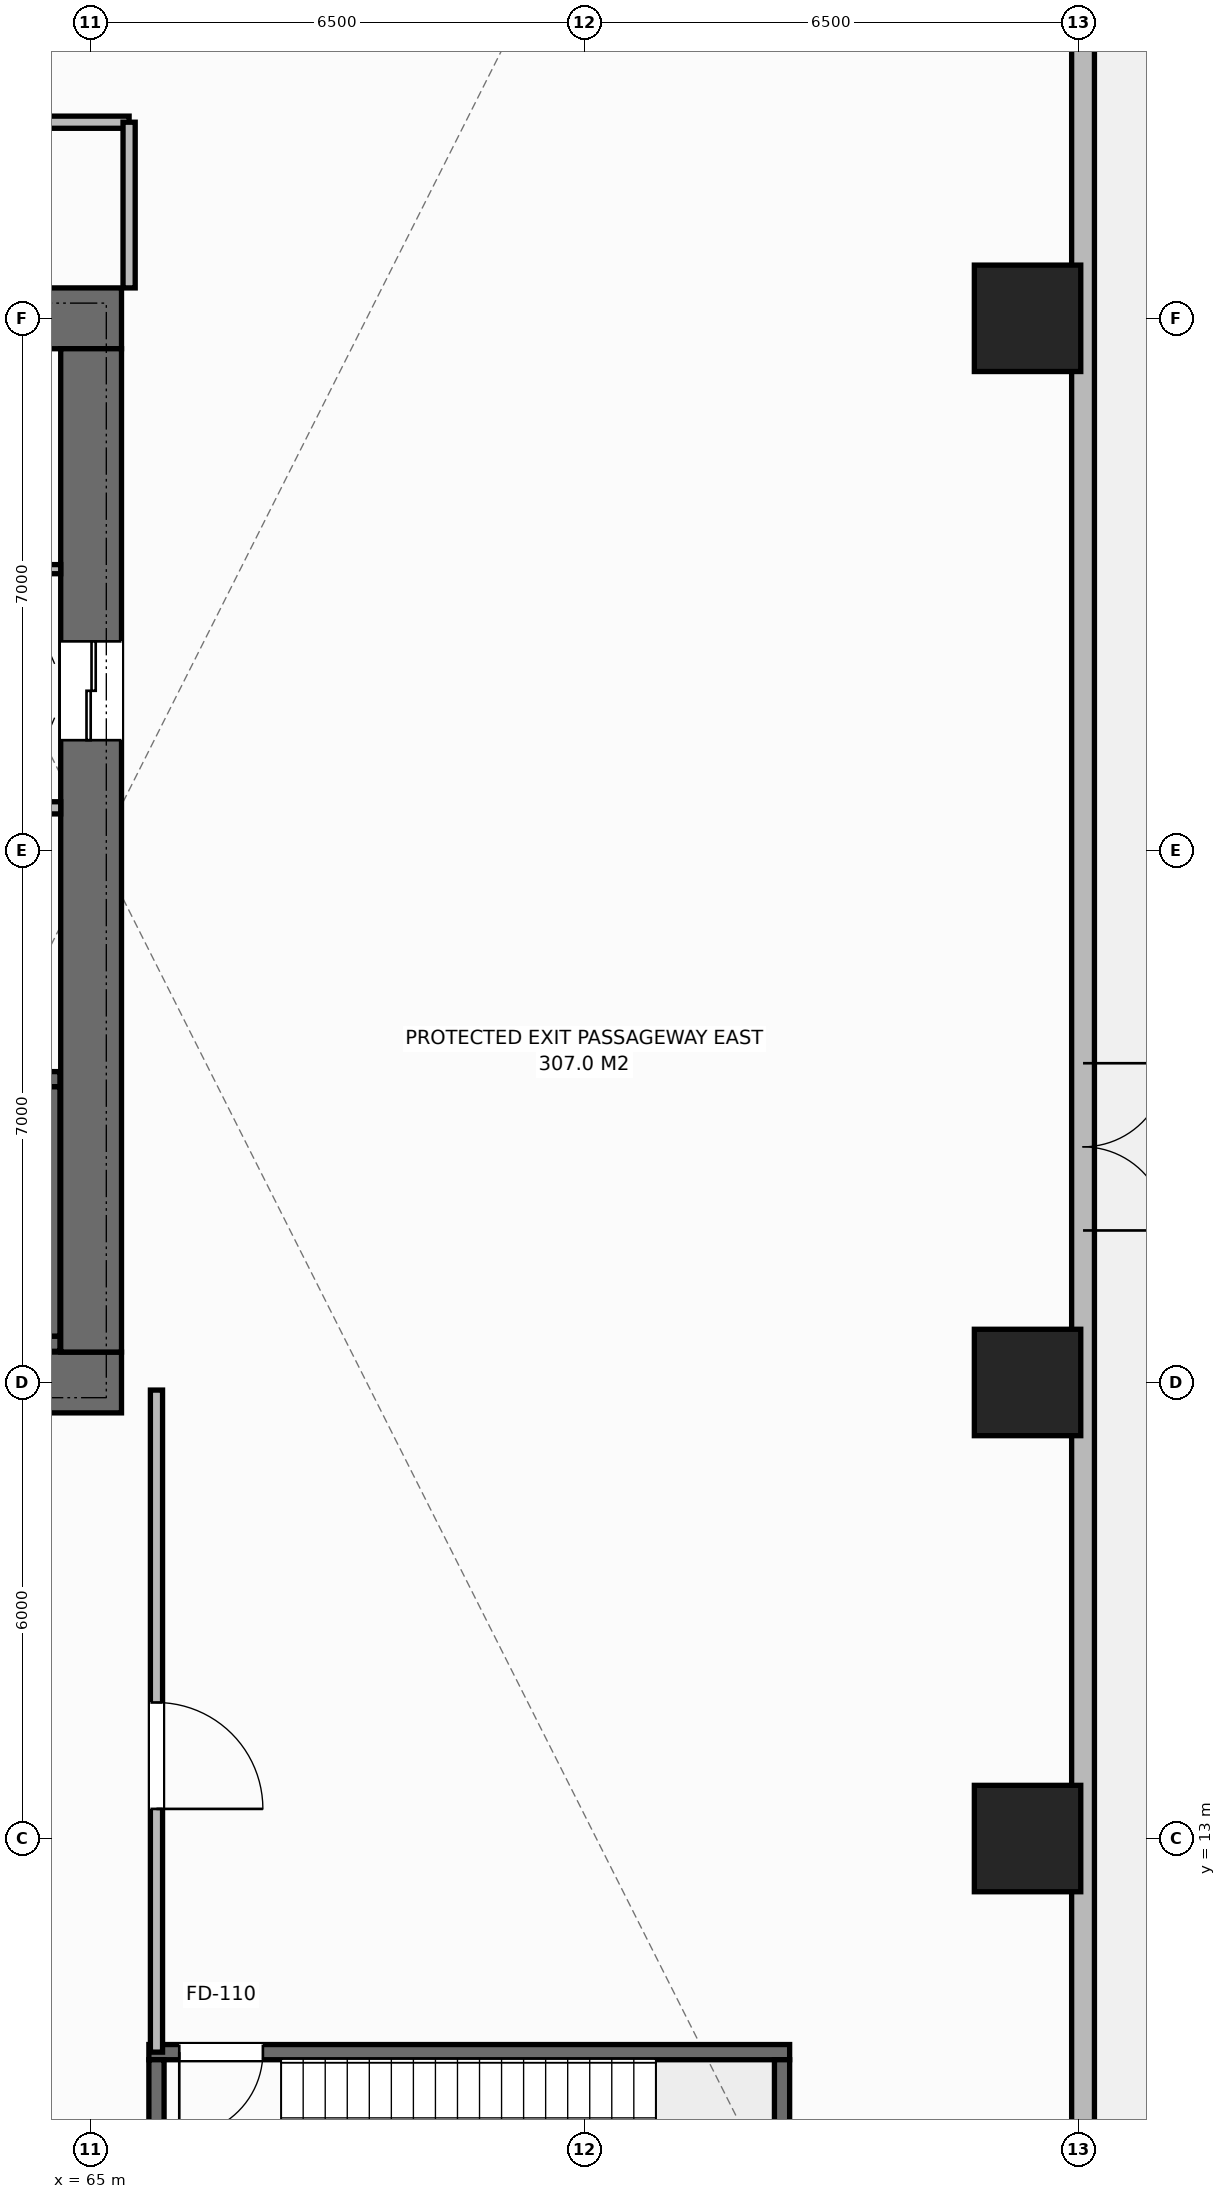
"""IFC4 building model, lengths in metres.
Left out: names, types, materials, properties, quantities, classifications, styles, units other than length and angle.
Written with IfcOpenShell. Run it as: python <this file> out.ifc"""

import sys

from ifc_helpers import new_model, si_unit, direction, frame, frame_2d, origin, origin_2d, place, context, subcontext, project, spatial, rectangle, extrude, element, fill, save


model = new_model("IFC4")
c1 = context("Model", 3, precision=1e-05, world=origin(), true_north=direction((0.0, 1.0)))
c2 = subcontext(c1, "Body", "Model", "MODEL_VIEW")
j1 = project(units=[si_unit("LENGTHUNIT", "METRE"), si_unit("PLANEANGLEUNIT", "RADIAN")], contexts=[c1])
p1 = place(None, origin())
s1 = spatial("IfcSite", under=j1, at=p1, CompositionType="ELEMENT")
p2 = place(p1, origin())
s2 = spatial("IfcBuilding", under=s1, at=p2, CompositionType="ELEMENT")
p3 = place(p2, origin())
s3 = spatial("IfcBuildingStorey", under=s2, at=p3, CompositionType="ELEMENT", Elevation=0.0)
p4 = place(p3, frame((51.6, 19.0, 0.0), z_axis=(0.0, 0.0, 1.0), x_axis=(1.0, 0.0, 0.0)))
e1 = element("IfcWall", 1, at=p4, inside=s3, PredefinedType="SHEAR", context=c2, shape_type="SweptSolid", body=[
    extrude(rectangle(XDim=13.8, YDim=0.8, at=frame_2d((6.9, 0.0))), origin(), (0.0, 0.0, 1.0), 6.0),
])
p5 = place(p4, frame((3.12, 0.0, 0.0)))
e2 = element("IfcOpeningElement", 2, at=p5, cuts=e1, PredefinedType="OPENING", context=c2, shape_type="SweptSolid", body=[
    extrude(rectangle(XDim=1.4, YDim=2.2, at=frame_2d((0.7, 1.1))), frame((0.0, 0.41, 0.0), z_axis=(0.0, -1.0, 0.0), x_axis=(1.0, 0.0, 0.0)), (0.0, 0.0, 1.0), 0.82),
])
p6 = place(p3, frame((51.6, 33.0, 0.0), z_axis=(0.0, 0.0, 1.0), x_axis=(1.0, 0.0, 0.0)))
e3 = element("IfcWall", 3, at=p6, inside=s3, PredefinedType="SHEAR", context=c2, shape_type="SweptSolid", body=[
    extrude(rectangle(XDim=13.8, YDim=0.8, at=frame_2d((6.9, 0.0))), origin(), (0.0, 0.0, 1.0), 6.0),
])
p7 = place(p6, frame((3.12, 0.0, 0.0)))
e4 = element("IfcOpeningElement", 4, at=p7, cuts=e3, PredefinedType="OPENING", context=c2, shape_type="SweptSolid", body=[
    extrude(rectangle(XDim=1.4, YDim=2.2, at=frame_2d((0.7, 1.1))), frame((0.0, 0.41, 0.0), z_axis=(0.0, -1.0, 0.0), x_axis=(1.0, 0.0, 0.0)), (0.0, 0.0, 1.0), 0.82),
])
p8 = place(p6, frame((11.0, 0.0, 0.0)))
e5 = element("IfcOpeningElement", 5, at=p8, cuts=e3, PredefinedType="OPENING", context=c2, shape_type="SweptSolid", body=[
    extrude(rectangle(XDim=0.9, YDim=2.15, at=frame_2d((0.45, 1.075))), frame((0.0, 0.41, 0.0), z_axis=(0.0, -1.0, 0.0), x_axis=(1.0, 0.0, 0.0)), (0.0, 0.0, 1.0), 0.82),
])
p9 = place(p6, frame((6.4, 0.0, 0.0)))
e6 = element("IfcOpeningElement", 6, at=p9, cuts=e3, PredefinedType="OPENING", context=c2, shape_type="SweptSolid", body=[
    extrude(rectangle(XDim=0.95, YDim=2.15, at=frame_2d((0.475, 1.075))), frame((0.0, 0.41, 0.0), z_axis=(0.0, -1.0, 0.0), x_axis=(1.0, 0.0, 0.0)), (0.0, 0.0, 1.0), 0.82),
])
p10 = place(p6, frame((8.85, 0.0, 0.0)))
e7 = element("IfcOpeningElement", 7, at=p10, cuts=e3, PredefinedType="OPENING", context=c2, shape_type="SweptSolid", body=[
    extrude(rectangle(XDim=0.9, YDim=2.15, at=frame_2d((0.45, 1.075))), frame((0.0, 0.41, 0.0), z_axis=(0.0, -1.0, 0.0), x_axis=(1.0, 0.0, 0.0)), (0.0, 0.0, 1.0), 0.82),
])
p11 = place(p3, frame((65.0, 19.4, 0.0), z_axis=(0.0, 0.0, 1.0), x_axis=(0.0, 1.0, 0.0)))
e8 = element("IfcWall", 8, at=p11, inside=s3, PredefinedType="SHEAR", context=c2, shape_type="SweptSolid", body=[
    extrude(rectangle(XDim=13.2, YDim=0.8, at=frame_2d((6.6, 0.0))), origin(), (0.0, 0.0, 1.0), 6.0),
])
p12 = place(p11, frame((8.05, 0.0, 0.0)))
e9 = element("IfcOpeningElement", 9, at=p12, cuts=e8, PredefinedType="OPENING", context=c2, shape_type="SweptSolid", body=[
    extrude(rectangle(XDim=1.3, YDim=2.2, at=frame_2d((0.65, 1.1))), frame((0.0, 0.41, 0.0), z_axis=(0.0, -1.0, 0.0), x_axis=(1.0, 0.0, 0.0)), (0.0, 0.0, 1.0), 0.82),
])
p13 = place(p3, frame((56.16, 19.51, 0.0), z_axis=(0.0, 0.0, 1.0), x_axis=(1.0, 0.0, 0.0)))
e10 = element("IfcWall", 10, at=p13, inside=s3, PredefinedType="SHEAR", context=c2, shape_type="SweptSolid", body=[
    extrude(rectangle(XDim=8.43, YDim=0.2, at=frame_2d((4.215, 0.0))), origin(), (0.0, 0.0, 1.0), 6.0),
])
p14 = place(p3, frame((56.16, 22.99, 0.0), z_axis=(0.0, 0.0, 1.0), x_axis=(1.0, 0.0, 0.0)))
e11 = element("IfcWall", 11, at=p14, inside=s3, PredefinedType="SHEAR", context=c2, shape_type="SweptSolid", body=[
    extrude(rectangle(XDim=8.43, YDim=0.2, at=frame_2d((4.215, 0.0))), origin(), (0.0, 0.0, 1.0), 6.0),
])
p15 = place(p14, frame((0.45, 0.0, 0.0)))
e12 = element("IfcOpeningElement", 12, at=p15, cuts=e11, PredefinedType="OPENING", context=c2, shape_type="SweptSolid", body=[
    extrude(rectangle(XDim=1.0, YDim=2.15, at=frame_2d((0.5, 1.075))), frame((0.0, 0.11, 0.0), z_axis=(0.0, -1.0, 0.0), x_axis=(1.0, 0.0, 0.0)), (0.0, 0.0, 1.0), 0.22),
])
p16 = place(p3, frame((64.49, 19.61, 0.0), z_axis=(0.0, 0.0, 1.0), x_axis=(0.0, 1.0, 0.0)))
e13 = element("IfcWall", 13, at=p16, inside=s3, PredefinedType="SHEAR", context=c2, shape_type="SweptSolid", body=[
    extrude(rectangle(XDim=3.28, YDim=0.2, at=frame_2d((1.64, 0.0))), origin(), (0.0, 0.0, 1.0), 6.0),
])
p17 = place(p3, frame((65.76, 10.19, 0.0), z_axis=(0.0, 0.0, 1.0), x_axis=(1.0, 0.0, 0.0)))
e14 = element("IfcWall", 14, at=p17, inside=s3, PredefinedType="SHEAR", context=c2, shape_type="SweptSolid", body=[
    extrude(rectangle(XDim=8.43, YDim=0.2, at=frame_2d((4.215, 0.0))), origin(), (0.0, 0.0, 1.0), 6.0),
])
p18 = place(p17, frame((0.4, 0.0, 0.0)))
e15 = element("IfcOpeningElement", 15, at=p18, cuts=e14, PredefinedType="OPENING", context=c2, shape_type="SweptSolid", body=[
    extrude(rectangle(XDim=1.1, YDim=2.15, at=frame_2d((0.55, 1.075))), frame((0.0, 0.11, 0.0), z_axis=(0.0, -1.0, 0.0), x_axis=(1.0, 0.0, 0.0)), (0.0, 0.0, 1.0), 0.22),
])
for number, where, z_axis, x_axis in (
    (16, (65.86, 6.81, 0.0), (0.0, 0.0, 1.0), (0.0, 1.0, 0.0)),
    (17, (74.09, 6.81, 0.0), (0.0, 0.0, 1.0), (0.0, 1.0, 0.0)),
):
    element("IfcWall", number, at=place(p3, frame(where, z_axis=z_axis, x_axis=x_axis)), inside=s3, PredefinedType="SHEAR", context=c2, shape_type="SweptSolid", body=[
        extrude(rectangle(XDim=3.28, YDim=0.2, at=frame_2d((1.64, 0.0))), origin(), (0.0, 0.0, 1.0), 6.0),
    ])
for number, where, z_axis, x_axis in (
    (18, (77.32, 13.0, 0.0), (0.0, 0.0, 1.0), (1.0, 0.0, 0.0)),
    (19, (77.32, 19.0, 0.0), (0.0, 0.0, 1.0), (1.0, 0.0, 0.0)),
    (20, (77.32, 33.0, 0.0), (0.0, 0.0, 1.0), (1.0, 0.0, 0.0)),
):
    element("IfcColumn", number, at=place(p3, frame(where, z_axis=z_axis, x_axis=x_axis)), inside=s3, PredefinedType="COLUMN", context=c2, shape_type="SweptSolid", body=[
        extrude(rectangle(XDim=1.4, YDim=1.4, at=origin_2d()), origin(), (0.0, 0.0, 1.0), 6.0),
    ])
p19 = place(p3, frame((78.05, 48.8, 0.0), z_axis=(0.0, 0.0, 1.0), x_axis=(0.0, -1.0, 0.0)))
e21 = element("IfcWall", 21, at=p19, inside=s3, PredefinedType="STANDARD", context=c2, shape_type="SweptSolid", body=[
    extrude(rectangle(XDim=45.6, YDim=0.3, at=frame_2d((22.8, 0.0))), origin(), (0.0, 0.0, 1.0), 5.72),
])
p20 = place(p19, frame((2.6, 0.0, 0.0)))
e22 = element("IfcOpeningElement", 22, at=p20, cuts=e21, PredefinedType="OPENING", context=c2, shape_type="SweptSolid", body=[
    extrude(rectangle(XDim=6.0, YDim=3.2, at=frame_2d((3.0, 1.6))), frame((0.0, 0.16, 0.0), z_axis=(0.0, -1.0, 0.0), x_axis=(1.0, 0.0, 0.0)), (0.0, 0.0, 1.0), 0.32),
])
p21 = place(p19, frame((25.6, 0.0, 0.0)))
e23 = element("IfcOpeningElement", 23, at=p21, cuts=e21, PredefinedType="OPENING", context=c2, shape_type="SweptSolid", body=[
    extrude(rectangle(XDim=2.2, YDim=2.4, at=frame_2d((1.1, 1.2))), frame((0.0, 0.16, 0.0), z_axis=(0.0, -1.0, 0.0), x_axis=(1.0, 0.0, 0.0)), (0.0, 0.0, 1.0), 0.32),
])
p22 = place(p3, frame((56.26, 26.56, 0.0), z_axis=(0.0, 0.0, 1.0), x_axis=(1.0, 0.0, 0.0)))
e24 = element("IfcWall", 24, at=p22, inside=s3, PredefinedType="STANDARD", context=c2, shape_type="SweptSolid", body=[
    extrude(rectangle(XDim=8.34, YDim=0.16, at=frame_2d((4.17, 0.0))), origin(), (0.0, 0.0, 1.0), 5.72),
])
p23 = place(p3, frame((61.87, 29.7, 0.0), z_axis=(0.0, 0.0, 1.0), x_axis=(1.0, 0.0, 0.0)))
e25 = element("IfcWall", 25, at=p23, inside=s3, PredefinedType="PARTITIONING", context=c2, shape_type="SweptSolid", body=[
    extrude(rectangle(XDim=2.73, YDim=0.12, at=frame_2d((1.365, 0.0))), origin(), (0.0, 0.0, 1.0), 5.72),
])
p24 = place(p3, frame((55.58, 35.58, 0.0), z_axis=(0.0, 0.0, 1.0), x_axis=(1.0, 0.0, 0.0)))
e26 = element("IfcWall", 26, at=p24, inside=s3, PredefinedType="STANDARD", context=c2, shape_type="SweptSolid", body=[
    extrude(rectangle(XDim=9.92, YDim=0.16, at=frame_2d((4.96, 0.0))), origin(), (0.0, 0.0, 1.0), 5.72),
])
p25 = place(p24, frame((1.1, 0.0, 0.0)))
e27 = element("IfcOpeningElement", 27, at=p25, cuts=e26, PredefinedType="OPENING", context=c2, shape_type="SweptSolid", body=[
    extrude(rectangle(XDim=0.9, YDim=2.15, at=frame_2d((0.45, 1.075))), frame((0.0, 0.09, 0.0), z_axis=(0.0, -1.0, 0.0), x_axis=(1.0, 0.0, 0.0)), (0.0, 0.0, 1.0), 0.18),
])
p26 = place(p24, frame((5.9, 0.0, 0.0)))
e28 = element("IfcOpeningElement", 28, at=p26, cuts=e26, PredefinedType="OPENING", context=c2, shape_type="SweptSolid", body=[
    extrude(rectangle(XDim=1.1, YDim=2.15, at=frame_2d((0.55, 1.075))), frame((0.0, 0.09, 0.0), z_axis=(0.0, -1.0, 0.0), x_axis=(1.0, 0.0, 0.0)), (0.0, 0.0, 1.0), 0.18),
])
p27 = place(p3, frame((65.5, 33.4, 0.0), z_axis=(0.0, 0.0, 1.0), x_axis=(0.0, 1.0, 0.0)))
e29 = element("IfcWall", 29, at=p27, inside=s3, PredefinedType="STANDARD", context=c2, shape_type="SweptSolid", body=[
    extrude(rectangle(XDim=2.18, YDim=0.16, at=frame_2d((1.09, 0.0))), origin(), (0.0, 0.0, 1.0), 5.72),
])
p28 = place(p3, frame((65.86, 10.19, 0.0), z_axis=(0.0, 0.0, 1.0), x_axis=(0.0, 1.0, 0.0)))
e30 = element("IfcWall", 30, at=p28, inside=s3, PredefinedType="STANDARD", context=c2, shape_type="SweptSolid", body=[
    extrude(rectangle(XDim=8.71, YDim=0.16, at=frame_2d((4.355, 0.0))), origin(), (0.0, 0.0, 1.0), 5.72),
])
p29 = place(p28, frame((3.2, 0.0, 0.0)))
e31 = element("IfcOpeningElement", 31, at=p29, cuts=e30, PredefinedType="OPENING", context=c2, shape_type="SweptSolid", body=[
    extrude(rectangle(XDim=1.4, YDim=2.2, at=frame_2d((0.7, 1.1))), frame((0.0, 0.09, 0.0), z_axis=(0.0, -1.0, 0.0), x_axis=(1.0, 0.0, 0.0)), (0.0, 0.0, 1.0), 0.18),
])
p30 = place(p21, origin())
e32 = element("IfcDoor", 32, at=p30, inside=s3, OperationType="DOUBLE_DOOR_SINGLE_SWING", PredefinedType="DOOR", context=c2, shape_type="SweptSolid", body=[
    extrude(rectangle(XDim=2.2, YDim=2.4, at=frame_2d((1.1, 1.2))), frame((0.0, 0.025, 0.0), z_axis=(0.0, -1.0, 0.0), x_axis=(1.0, 0.0, 0.0)), (0.0, 0.0, 1.0), 0.05),
])
fill(e23, e32)
p31 = place(p12, origin())
e33 = element("IfcDoor", 33, at=p31, inside=s3, OperationType="DOUBLE_DOOR_SLIDING", PredefinedType="DOOR", context=c2, shape_type="SweptSolid", body=[
    extrude(rectangle(XDim=1.3, YDim=2.2, at=frame_2d((0.65, 1.1))), frame((0.0, 0.025, 0.0), z_axis=(0.0, -1.0, 0.0), x_axis=(1.0, 0.0, 0.0)), (0.0, 0.0, 1.0), 0.05),
])
fill(e9, e33)
p32 = place(p18, origin())
e34 = element("IfcDoor", 34, at=p32, inside=s3, OperationType="SINGLE_SWING_RIGHT", PredefinedType="DOOR", context=c2, shape_type="SweptSolid", body=[
    extrude(rectangle(XDim=1.1, YDim=2.15, at=frame_2d((0.55, 1.075))), frame((0.0, 0.025, 0.0), z_axis=(0.0, -1.0, 0.0), x_axis=(1.0, 0.0, 0.0)), (0.0, 0.0, 1.0), 0.05),
])
fill(e15, e34)
p33 = place(p29, origin())
e35 = element("IfcDoor", 35, at=p33, inside=s3, OperationType="SINGLE_SWING_RIGHT", PredefinedType="DOOR", context=c2, shape_type="SweptSolid", body=[
    extrude(rectangle(XDim=1.4, YDim=2.2, at=frame_2d((0.7, 1.1))), frame((0.0, 0.025, 0.0), z_axis=(0.0, -1.0, 0.0), x_axis=(1.0, 0.0, 0.0)), (0.0, 0.0, 1.0), 0.05),
])
fill(e31, e35)
save(model, sys.argv[1])
